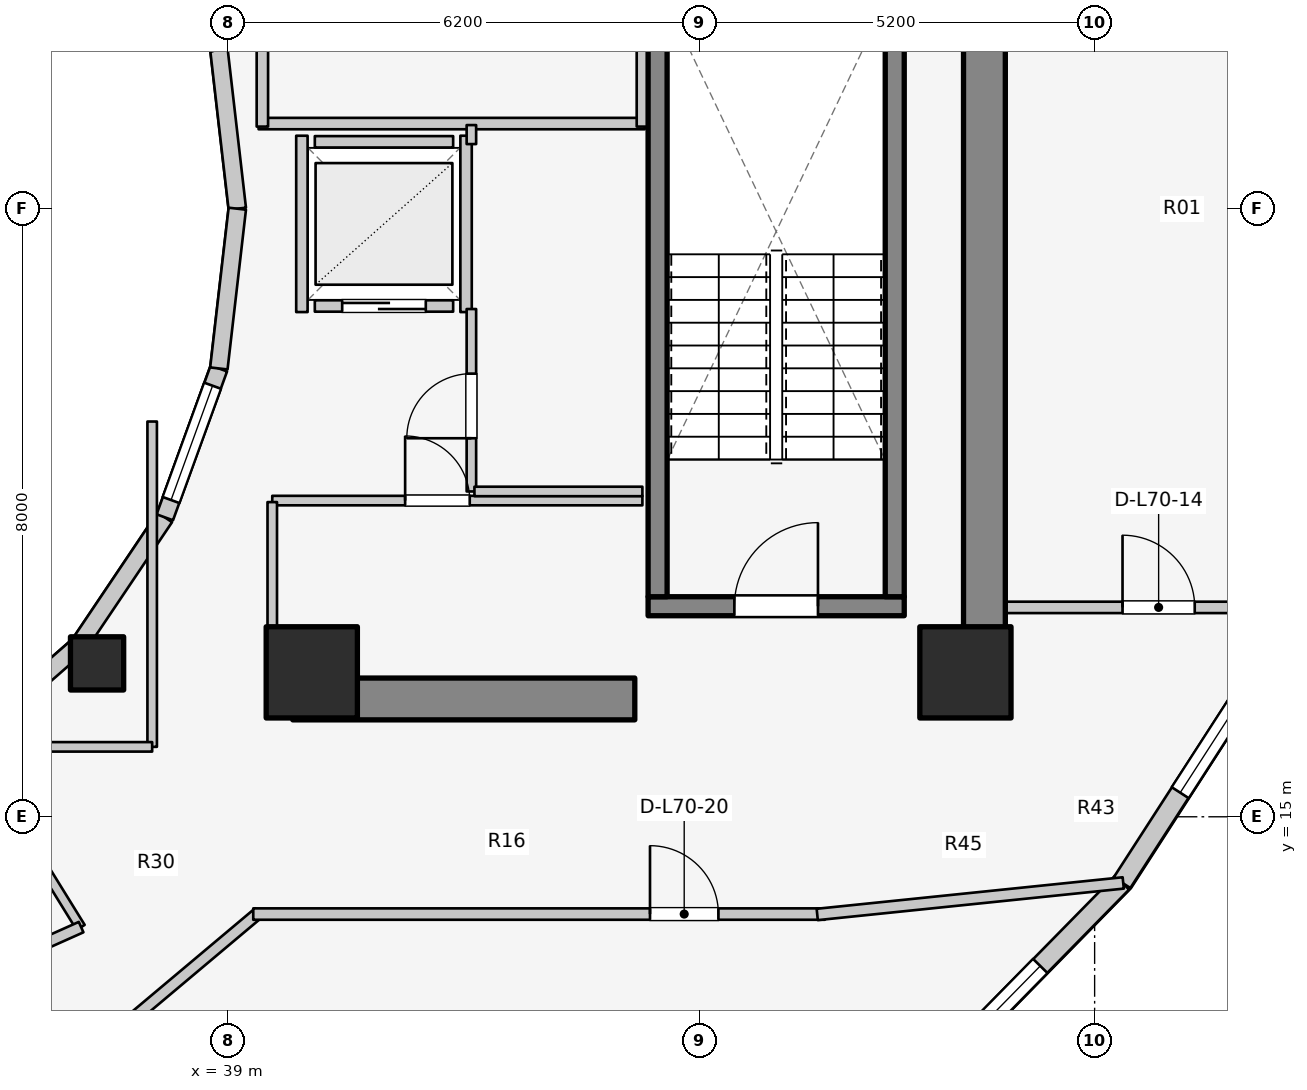
"""IFC4 building model, lengths in metres.
Left out: names, types, materials, properties, quantities, classifications, styles, units other than length and angle.
Written with IfcOpenShell. Run it as: python <this file> out.ifc"""

import sys

from ifc_helpers import new_model, si_unit, direction, frame, frame_2d, origin, origin_2d, place, context, subcontext, project, spatial, rectangle, extrude, element, fill, save


model = new_model("IFC4")
c1 = context("Model", 3, precision=1e-05, world=origin(), true_north=direction((0.0, 1.0)))
c2 = subcontext(c1, "Body", "Model", "MODEL_VIEW")
j1 = project(units=[si_unit("LENGTHUNIT", "METRE"), si_unit("PLANEANGLEUNIT", "RADIAN")], contexts=[c1])
p1 = place(None, origin())
s1 = spatial("IfcSite", under=j1, at=p1, CompositionType="ELEMENT")
p2 = place(p1, origin())
s2 = spatial("IfcBuilding", under=s1, at=p2, CompositionType="ELEMENT")
p3 = place(p2, frame((0.0, 0.0, 229.5)))
s3 = spatial("IfcBuildingStorey", under=s2, at=p3, CompositionType="ELEMENT", Elevation=229.5)
p4 = place(p3, frame((48.95, 17.05, 0.0), z_axis=(0.0, 0.0, 1.0), x_axis=(0.0, 1.0, 0.0)))
e1 = element("IfcWall", 1, at=p4, inside=s3, PredefinedType="SHEAR", context=c2, shape_type="SweptSolid", body=[
    extrude(rectangle(XDim=12.8, YDim=0.55, at=frame_2d((6.4, 0.0))), origin(), (0.0, 0.0, 1.0), 3.1),
])
p5 = place(p3, frame((39.85, 16.55, 0.0), z_axis=(0.0, 0.0, 1.0), x_axis=(1.0, 0.0, 0.0)))
e2 = element("IfcWall", 2, at=p5, inside=s3, PredefinedType="SHEAR", context=c2, shape_type="SweptSolid", body=[
    extrude(rectangle(XDim=4.5, YDim=0.55, at=frame_2d((2.25, 0.0))), origin(), (0.0, 0.0, 1.0), 3.1),
])
p6 = place(p3, frame((44.525, 17.77, 0.0), z_axis=(0.0, 0.0, 1.0), x_axis=(1.0, 0.0, 0.0)))
e3 = element("IfcWall", 3, at=p6, inside=s3, PredefinedType="SOLIDWALL", context=c2, shape_type="SweptSolid", body=[
    extrude(rectangle(XDim=3.37, YDim=0.25, at=frame_2d((1.685, 0.0))), origin(), (0.0, 0.0, 1.0), 3.1),
])
p7 = place(p6, frame((1.135, 0.0, 0.0)))
e4 = element("IfcOpeningElement", 4, at=p7, cuts=e3, PredefinedType="OPENING", context=c2, shape_type="SweptSolid", body=[
    extrude(rectangle(XDim=1.1, YDim=2.1, at=frame_2d((0.55, 1.05))), frame((0.0, 0.135, 0.0), z_axis=(0.0, -1.0, 0.0), x_axis=(1.0, 0.0, 0.0)), (0.0, 0.0, 1.0), 0.27),
])
for number, where, z_axis, x_axis in (
    (5, (44.65, 17.895, 0.0), (0.0, 0.0, 1.0), (0.0, 1.0, 0.0)),
    (6, (47.77, 17.895, 0.0), (0.0, 0.0, 1.0), (0.0, 1.0, 0.0)),
):
    element("IfcWall", number, at=place(p3, frame(where, z_axis=z_axis, x_axis=x_axis)), inside=s3, PredefinedType="SOLIDWALL", context=c2, shape_type="SweptSolid", body=[
        extrude(rectangle(XDim=7.81, YDim=0.25, at=frame_2d((3.905, 0.0))), origin(), (0.0, 0.0, 1.0), 3.1),
    ])
for number, where, z_axis, x_axis in (
    (7, (40.1, 16.9, 0.0), (0.0, 0.0, 1.0), (1.0, 0.0, 0.0)),
    (8, (48.7, 16.9, 0.0), (0.0, 0.0, 1.0), (1.0, 0.0, 0.0)),
):
    element("IfcColumn", number, at=place(p3, frame(where, z_axis=z_axis, x_axis=x_axis)), inside=s3, PredefinedType="COLUMN", context=c2, shape_type="SweptSolid", body=[
        extrude(rectangle(XDim=1.2, YDim=1.2, at=origin_2d()), origin(), (0.0, 0.0, 1.0), 3.1),
    ])
p8 = place(p3, frame((37.275, 17.018, 0.0), z_axis=(0.0, 0.0, 1.0), x_axis=(1.0, 0.0, 0.0)))
e9 = element("IfcColumn", 9, at=p8, inside=s3, PredefinedType="COLUMN", context=c2, shape_type="SweptSolid", body=[
    extrude(rectangle(XDim=0.7, YDim=0.7, at=origin_2d()), origin(), (0.0, 0.0, 1.0), 3.1),
])
p9 = place(p3, frame((39.12, 23.0, 0.0), z_axis=(0.0, 0.0, 1.0), x_axis=(-0.114711713601, 0.993398823617, 0.0)))
e10 = element("IfcWall", 10, at=p9, inside=s3, PredefinedType="STANDARD", context=c2, shape_type="SweptSolid", body=[
    extrude(rectangle(XDim=2.115, YDim=0.23, at=frame_2d((1.058, 0.0))), origin(), (0.0, 0.0, 1.0), 2.84),
])
p10 = place(p3, frame((35.56, 15.968, 0.0), z_axis=(0.0, 0.0, 1.0), x_axis=(0.752576694707, 0.658504607869, 0.0)))
e11 = element("IfcWall", 11, at=p10, inside=s3, PredefinedType="STANDARD", context=c2, shape_type="SweptSolid", body=[
    extrude(rectangle(XDim=1.959, YDim=0.23, at=frame_2d((0.98, 0.0))), origin(), (0.0, 0.0, 1.0), 2.16),
])
p11 = place(p3, frame((37.035, 17.258, 0.0), z_axis=(0.0, 0.0, 1.0), x_axis=(0.558197800898, 0.829707909492, 0.0)))
e12 = element("IfcWall", 12, at=p11, inside=s3, PredefinedType="STANDARD", context=c2, shape_type="SweptSolid", body=[
    extrude(rectangle(XDim=2.027, YDim=0.23, at=frame_2d((1.013, 0.0))), origin(), (0.0, 0.0, 1.0), 2.16),
])
p12 = place(p3, frame((38.166, 18.94, 0.0), z_axis=(0.0, 0.0, 1.0), x_axis=(0.341423187295, 0.93990968033, 0.0)))
e13 = element("IfcWall", 13, at=p12, inside=s3, PredefinedType="STANDARD", context=c2, shape_type="SweptSolid", body=[
    extrude(rectangle(XDim=2.084, YDim=0.23, at=frame_2d((1.042, 0.0))), origin(), (0.0, 0.0, 1.0), 2.84),
])
p13 = place(p12, frame((0.242, 0.0, 0.85)))
e14 = element("IfcOpeningElement", 14, at=p13, cuts=e13, PredefinedType="OPENING", context=c2, shape_type="SweptSolid", body=[
    extrude(rectangle(XDim=1.6, YDim=1.65, at=frame_2d((0.8, 0.825))), frame((0.0, 0.125, 0.0), z_axis=(0.0, -1.0, 0.0), x_axis=(1.0, 0.0, 0.0)), (0.0, 0.0, 1.0), 0.25),
])
p14 = place(p3, frame((38.877, 20.898, 0.0), z_axis=(0.0, 0.0, 1.0), x_axis=(0.114711713601, 0.993398823617, 0.0)))
e15 = element("IfcWall", 15, at=p14, inside=s3, PredefinedType="STANDARD", context=c2, shape_type="SweptSolid", body=[
    extrude(rectangle(XDim=2.115, YDim=0.23, at=frame_2d((1.058, 0.0))), origin(), (0.0, 0.0, 1.0), 2.84),
])
p15 = place(p3, frame((47.558, 10.871, 0.0), z_axis=(0.0, 0.0, 1.0), x_axis=(0.700642973333, 0.713512034881, 0.0)))
e16 = element("IfcWall", 16, at=p15, inside=s3, PredefinedType="STANDARD", context=c2, shape_type="SweptSolid", body=[
    extrude(rectangle(XDim=4.572, YDim=0.26, at=frame_2d((2.286, 0.0))), origin(), (0.0, 0.0, 1.0), 2.85),
])
p16 = place(p15, frame((1.536, 0.0, 0.75)))
e17 = element("IfcOpeningElement", 17, at=p16, cuts=e16, PredefinedType="OPENING", context=c2, shape_type="SweptSolid", body=[
    extrude(rectangle(XDim=1.5, YDim=1.6, at=frame_2d((0.75, 0.8))), frame((0.0, 0.14, 0.0), z_axis=(0.0, -1.0, 0.0), x_axis=(1.0, 0.0, 0.0)), (0.0, 0.0, 1.0), 0.28),
])
p17 = place(p3, frame((50.761, 14.133, 0.0), z_axis=(0.0, 0.0, 1.0), x_axis=(0.542641766008, 0.839964233634, 0.0)))
e18 = element("IfcWall", 18, at=p17, inside=s3, PredefinedType="STANDARD", context=c2, shape_type="SweptSolid", body=[
    extrude(rectangle(XDim=4.319, YDim=0.26, at=frame_2d((2.16, 0.0))), origin(), (0.0, 0.0, 1.0), 2.85),
])
p18 = place(p17, frame((1.41, 0.0, 0.75)))
e19 = element("IfcOpeningElement", 19, at=p18, cuts=e18, PredefinedType="OPENING", context=c2, shape_type="SweptSolid", body=[
    extrude(rectangle(XDim=1.5, YDim=1.6, at=frame_2d((0.75, 0.8))), frame((0.0, 0.14, 0.0), z_axis=(0.0, -1.0, 0.0), x_axis=(1.0, 0.0, 0.0)), (0.0, 0.0, 1.0), 0.28),
])
p19 = place(p3, frame((40.14, 21.72, 0.0), z_axis=(0.0, 0.0, 1.0), x_axis=(1.0, 0.0, 0.0)))
e20 = element("IfcWall", 20, at=p19, inside=s3, PredefinedType="SOLIDWALL", context=c2, shape_type="SweptSolid", body=[
    extrude(rectangle(XDim=1.82, YDim=0.15, at=frame_2d((0.91, 0.0))), origin(), (0.0, 0.0, 1.0), 2.12),
])
p20 = place(p19, frame((0.36, 0.0, 0.0)))
e21 = element("IfcOpeningElement", 21, at=p20, cuts=e20, PredefinedType="OPENING", context=c2, shape_type="SweptSolid", body=[
    extrude(rectangle(XDim=1.1, YDim=2.1, at=frame_2d((0.55, 1.05))), frame((0.0, 0.085, 0.0), z_axis=(0.0, -1.0, 0.0), x_axis=(1.0, 0.0, 0.0)), (0.0, 0.0, 1.0), 0.17),
])
p21 = place(p3, frame((40.14, 23.88, 0.0), z_axis=(0.0, 0.0, 1.0), x_axis=(1.0, 0.0, 0.0)))
e22 = element("IfcWall", 22, at=p21, inside=s3, PredefinedType="SOLIDWALL", context=c2, shape_type="SweptSolid", body=[
    extrude(rectangle(XDim=1.82, YDim=0.15, at=frame_2d((0.91, 0.0))), origin(), (0.0, 0.0, 1.0), 2.12),
])
p22 = place(p3, frame((39.97, 21.64, 0.0), z_axis=(0.0, 0.0, 1.0), x_axis=(0.0, 1.0, 0.0)))
e23 = element("IfcWall", 23, at=p22, inside=s3, PredefinedType="SOLIDWALL", context=c2, shape_type="SweptSolid", body=[
    extrude(rectangle(XDim=2.32, YDim=0.15, at=frame_2d((1.16, 0.0))), origin(), (0.0, 0.0, 1.0), 2.12),
])
p23 = place(p3, frame((42.13, 21.64, 0.0), z_axis=(0.0, 0.0, 1.0), x_axis=(0.0, 1.0, 0.0)))
e24 = element("IfcWall", 24, at=p23, inside=s3, PredefinedType="SOLIDWALL", context=c2, shape_type="SweptSolid", body=[
    extrude(rectangle(XDim=2.32, YDim=0.15, at=frame_2d((1.16, 0.0))), origin(), (0.0, 0.0, 1.0), 2.855),
])
p24 = place(p3, frame((39.4, 24.12, 0.0), z_axis=(0.0, 0.0, 1.0), x_axis=(1.0, 0.0, 0.0)))
e25 = element("IfcWall", 25, at=p24, inside=s3, PredefinedType="PARTITIONING", context=c2, shape_type="SweptSolid", body=[
    extrude(rectangle(XDim=5.08, YDim=0.15, at=frame_2d((2.54, 0.0))), origin(), (0.0, 0.0, 1.0), 2.12),
])
p25 = place(p3, frame((44.45, 24.08, 0.0), z_axis=(0.0, 0.0, 1.0), x_axis=(0.0, 1.0, 0.0)))
e26 = element("IfcWall", 26, at=p25, inside=s3, PredefinedType="PARTITIONING", context=c2, shape_type="SweptSolid", body=[
    extrude(rectangle(XDim=3.2, YDim=0.15, at=frame_2d((1.6, 0.0))), origin(), (0.0, 0.0, 1.0), 2.855),
])
p26 = place(p3, frame((39.45, 24.08, 0.0), z_axis=(0.0, 0.0, 1.0), x_axis=(0.0, 1.0, 0.0)))
e27 = element("IfcWall", 27, at=p26, inside=s3, PredefinedType="PARTITIONING", context=c2, shape_type="SweptSolid", body=[
    extrude(rectangle(XDim=3.4, YDim=0.15, at=frame_2d((1.7, 0.0))), origin(), (0.0, 0.0, 1.0), 2.855),
])
p27 = place(p26, frame((1.894, 0.0, 0.0)))
e28 = element("IfcOpeningElement", 28, at=p27, cuts=e27, PredefinedType="OPENING", context=c2, shape_type="SweptSolid", body=[
    extrude(rectangle(XDim=1.1, YDim=2.1, at=frame_2d((0.55, 1.05))), frame((0.0, 0.085, 0.0), z_axis=(0.0, -1.0, 0.0), x_axis=(1.0, 0.0, 0.0)), (0.0, 0.0, 1.0), 0.17),
])
p28 = place(p3, frame((39.58, 19.16, 0.0), z_axis=(0.0, 0.0, 1.0), x_axis=(1.0, 0.0, 0.0)))
e29 = element("IfcWall", 29, at=p28, inside=s3, PredefinedType="PARTITIONING", context=c2, shape_type="SweptSolid", body=[
    extrude(rectangle(XDim=4.87, YDim=0.125, at=frame_2d((2.435, 0.0))), origin(), (0.0, 0.0, 1.0), 2.12),
])
p29 = place(p28, frame((1.748, 0.0, 0.0)))
e30 = element("IfcOpeningElement", 30, at=p29, cuts=e29, PredefinedType="OPENING", context=c2, shape_type="SweptSolid", body=[
    extrude(rectangle(XDim=0.85, YDim=2.05, at=frame_2d((0.425, 1.025))), frame((0.0, 0.073, 0.0), z_axis=(0.0, -1.0, 0.0), x_axis=(1.0, 0.0, 0.0)), (0.0, 0.0, 1.0), 0.145),
])
p30 = place(p3, frame((39.58, 17.1, 0.0), z_axis=(0.0, 0.0, 1.0), x_axis=(0.0, 1.0, 0.0)))
e31 = element("IfcWall", 31, at=p30, inside=s3, PredefinedType="PARTITIONING", context=c2, shape_type="SweptSolid", body=[
    extrude(rectangle(XDim=2.04, YDim=0.125, at=frame_2d((1.02, 0.0))), origin(), (0.0, 0.0, 1.0), 2.232),
])
p31 = place(p3, frame((42.2, 19.28, 0.0), z_axis=(0.0, 0.0, 1.0), x_axis=(0.0, 1.0, 0.0)))
e32 = element("IfcWall", 32, at=p31, inside=s3, PredefinedType="PARTITIONING", context=c2, shape_type="SweptSolid", body=[
    extrude(rectangle(XDim=2.4, YDim=0.125, at=frame_2d((1.2, 0.0))), origin(), (0.0, 0.0, 1.0), 2.855),
])
p32 = place(p31, frame((0.7, 0.0, 0.0)))
e33 = element("IfcOpeningElement", 33, at=p32, cuts=e32, PredefinedType="OPENING", context=c2, shape_type="SweptSolid", body=[
    extrude(rectangle(XDim=0.85, YDim=2.05, at=frame_2d((0.425, 1.025))), frame((0.0, 0.073, 0.0), z_axis=(0.0, -1.0, 0.0), x_axis=(1.0, 0.0, 0.0)), (0.0, 0.0, 1.0), 0.145),
])
p33 = place(p3, frame((42.2, 23.85, 0.0), z_axis=(0.0, 0.0, 1.0), x_axis=(0.0, 1.0, 0.0)))
e34 = element("IfcWall", 34, at=p33, inside=s3, PredefinedType="PARTITIONING", context=c2, shape_type="SweptSolid", body=[
    extrude(rectangle(XDim=0.25, YDim=0.125, at=frame_2d((0.125, 0.0))), origin(), (0.0, 0.0, 1.0), 2.855),
])
p34 = place(p3, frame((42.24, 19.28, 0.0), z_axis=(0.0, 0.0, 1.0), x_axis=(1.0, 0.0, 0.0)))
e35 = element("IfcWall", 35, at=p34, inside=s3, PredefinedType="PARTITIONING", context=c2, shape_type="SweptSolid", body=[
    extrude(rectangle(XDim=2.21, YDim=0.125, at=frame_2d((1.105, 0.0))), origin(), (0.0, 0.0, 1.0), 2.12),
])
p35 = place(p3, frame((35.55, 15.985, 0.0), z_axis=(0.0, 0.0, 1.0), x_axis=(0.52592395012, -0.850531597702, 0.0)))
e36 = element("IfcWall", 36, at=p35, inside=s3, PredefinedType="PARTITIONING", context=c2, shape_type="SweptSolid", body=[
    extrude(rectangle(XDim=2.869, YDim=0.125, at=frame_2d((1.435, 0.0))), origin(), (0.0, 0.0, 1.0), 2.376),
])
p36 = place(p3, frame((34.617, 12.454, 0.0), z_axis=(0.0, 0.0, 1.0), x_axis=(0.912859324183, 0.408274239027, 0.0)))
e37 = element("IfcWall", 37, at=p36, inside=s3, PredefinedType="PARTITIONING", context=c2, shape_type="SweptSolid", body=[
    extrude(rectangle(XDim=2.682, YDim=0.15, at=frame_2d((1.341, 0.0))), origin(), (0.0, 0.0, 1.0), 2.376),
])
p37 = place(p36, frame((0.866, 0.0, 0.0)))
e38 = element("IfcOpeningElement", 38, at=p37, cuts=e37, PredefinedType="OPENING", context=c2, shape_type="SweptSolid", body=[
    extrude(rectangle(XDim=0.95, YDim=2.1, at=frame_2d((0.475, 1.05))), frame((0.0, 0.085, 0.0), z_axis=(0.0, -1.0, 0.0), x_axis=(1.0, 0.0, 0.0)), (0.0, 0.0, 1.0), 0.17),
])
p38 = place(p3, frame((38.0, 15.92, 0.0), z_axis=(0.0, 0.0, 1.0), x_axis=(0.0, 1.0, 0.0)))
e39 = element("IfcWall", 39, at=p38, inside=s3, PredefinedType="PARTITIONING", context=c2, shape_type="SweptSolid", body=[
    extrude(rectangle(XDim=4.28, YDim=0.125, at=frame_2d((2.14, 0.0))), origin(), (0.0, 0.0, 1.0), 2.232),
])
p39 = place(p3, frame((35.4, 15.92, 0.0), z_axis=(0.0, 0.0, 1.0), x_axis=(1.0, 0.0, 0.0)))
e40 = element("IfcWall", 40, at=p39, inside=s3, PredefinedType="PARTITIONING", context=c2, shape_type="SweptSolid", body=[
    extrude(rectangle(XDim=2.6, YDim=0.125, at=frame_2d((1.3, 0.0))), origin(), (0.0, 0.0, 1.0), 2.232),
])
p40 = place(p3, frame((48.95, 17.755, 0.0), z_axis=(0.0, 0.0, 1.0), x_axis=(1.0, 0.0, 0.0)))
e41 = element("IfcWall", 41, at=p40, inside=s3, PredefinedType="PARTITIONING", context=c2, shape_type="SweptSolid", body=[
    extrude(rectangle(XDim=4.175, YDim=0.15, at=frame_2d((2.087, 0.0))), origin(), (0.0, 0.0, 1.0), 2.855),
])
p41 = place(p40, frame((1.817, 0.0, 0.0)))
e42 = element("IfcOpeningElement", 42, at=p41, cuts=e41, PredefinedType="OPENING", context=c2, shape_type="SweptSolid", body=[
    extrude(rectangle(XDim=0.95, YDim=2.1, at=frame_2d((0.475, 1.05))), frame((0.0, 0.085, 0.0), z_axis=(0.0, -1.0, 0.0), x_axis=(1.0, 0.0, 0.0)), (0.0, 0.0, 1.0), 0.17),
])
p42 = place(p3, frame((37.791, 12.385, 0.0), z_axis=(0.0, 0.0, 1.0), x_axis=(0.765677451641, 0.643224719711, 0.0)))
e43 = element("IfcWall", 43, at=p42, inside=s3, PredefinedType="PARTITIONING", context=c2, shape_type="SweptSolid", body=[
    extrude(rectangle(XDim=2.105, YDim=0.15, at=frame_2d((1.053, 0.0))), origin(), (0.0, 0.0, 1.0), 2.376),
])
p43 = place(p3, frame((39.33, 13.72, 0.0), z_axis=(0.0, 0.0, 1.0), x_axis=(1.0, 0.0, 0.0)))
e44 = element("IfcWall", 44, at=p43, inside=s3, PredefinedType="PARTITIONING", context=c2, shape_type="SweptSolid", body=[
    extrude(rectangle(XDim=7.52, YDim=0.15, at=frame_2d((3.76, 0.0))), origin(), (0.0, 0.0, 1.0), 2.376),
])
p44 = place(p43, frame((5.22, 0.0, 0.0)))
e45 = element("IfcOpeningElement", 45, at=p44, cuts=e44, PredefinedType="OPENING", context=c2, shape_type="SweptSolid", body=[
    extrude(rectangle(XDim=0.9, YDim=2.1, at=frame_2d((0.45, 1.05))), frame((0.0, 0.085, 0.0), z_axis=(0.0, -1.0, 0.0), x_axis=(1.0, 0.0, 0.0)), (0.0, 0.0, 1.0), 0.17),
])
p45 = place(p3, frame((46.75, 13.715, 0.0), z_axis=(0.0, 0.0, 1.0), x_axis=(0.994734711466, 0.102483431859, 0.0)))
e46 = element("IfcWall", 46, at=p45, inside=s3, PredefinedType="PARTITIONING", context=c2, shape_type="SweptSolid", body=[
    extrude(rectangle(XDim=4.047, YDim=0.15, at=frame_2d((2.024, 0.0))), origin(), (0.0, 0.0, 1.0), 2.22),
])
p46 = place(p13, origin())
e47 = element("IfcWindow", 47, at=p46, inside=s3, PartitioningType="SINGLE_PANEL", PredefinedType="WINDOW", context=c2, shape_type="SweptSolid", body=[
    extrude(rectangle(XDim=1.6, YDim=1.65, at=frame_2d((0.8, 0.825))), frame((0.0, 0.03, 0.0), z_axis=(0.0, -1.0, 0.0), x_axis=(1.0, 0.0, 0.0)), (0.0, 0.0, 1.0), 0.06),
])
fill(e14, e47)
p47 = place(p16, origin())
e48 = element("IfcWindow", 48, at=p47, inside=s3, PartitioningType="SINGLE_PANEL", PredefinedType="WINDOW", context=c2, shape_type="SweptSolid", body=[
    extrude(rectangle(XDim=1.5, YDim=1.6, at=frame_2d((0.75, 0.8))), frame((0.0, 0.03, 0.0), z_axis=(0.0, -1.0, 0.0), x_axis=(1.0, 0.0, 0.0)), (0.0, 0.0, 1.0), 0.06),
])
fill(e17, e48)
p48 = place(p18, origin())
e49 = element("IfcWindow", 49, at=p48, inside=s3, PartitioningType="SINGLE_PANEL", PredefinedType="WINDOW", context=c2, shape_type="SweptSolid", body=[
    extrude(rectangle(XDim=1.5, YDim=1.6, at=frame_2d((0.75, 0.8))), frame((0.0, 0.03, 0.0), z_axis=(0.0, -1.0, 0.0), x_axis=(1.0, 0.0, 0.0)), (0.0, 0.0, 1.0), 0.06),
])
fill(e19, e49)
p49 = place(p7, origin())
e50 = element("IfcDoor", 50, at=p49, inside=s3, OperationType="SINGLE_SWING_RIGHT", PredefinedType="DOOR", context=c2, shape_type="SweptSolid", body=[
    extrude(rectangle(XDim=1.1, YDim=2.1, at=frame_2d((0.55, 1.05))), frame((0.0, 0.025, 0.0), z_axis=(0.0, -1.0, 0.0), x_axis=(1.0, 0.0, 0.0)), (0.0, 0.0, 1.0), 0.05),
])
fill(e4, e50)
p50 = place(p20, origin())
e51 = element("IfcDoor", 51, at=p50, inside=s3, OperationType="DOUBLE_DOOR_SLIDING", PredefinedType="DOOR", context=c2, shape_type="SweptSolid", body=[
    extrude(rectangle(XDim=1.1, YDim=2.1, at=frame_2d((0.55, 1.05))), frame((0.0, 0.025, 0.0), z_axis=(0.0, -1.0, 0.0), x_axis=(1.0, 0.0, 0.0)), (0.0, 0.0, 1.0), 0.05),
])
fill(e21, e51)
p51 = place(p29, origin())
e52 = element("IfcDoor", 52, at=p51, inside=s3, OperationType="SINGLE_SWING_LEFT", PredefinedType="DOOR", context=c2, shape_type="SweptSolid", body=[
    extrude(rectangle(XDim=0.85, YDim=2.05, at=frame_2d((0.425, 1.025))), frame((0.0, 0.025, 0.0), z_axis=(0.0, -1.0, 0.0), x_axis=(1.0, 0.0, 0.0)), (0.0, 0.0, 1.0), 0.05),
])
fill(e30, e52)
p52 = place(p32, origin())
e53 = element("IfcDoor", 53, at=p52, inside=s3, OperationType="SINGLE_SWING_LEFT", PredefinedType="DOOR", context=c2, shape_type="SweptSolid", body=[
    extrude(rectangle(XDim=0.85, YDim=2.05, at=frame_2d((0.425, 1.025))), frame((0.0, 0.025, 0.0), z_axis=(0.0, -1.0, 0.0), x_axis=(1.0, 0.0, 0.0)), (0.0, 0.0, 1.0), 0.05),
])
fill(e33, e53)
p53 = place(p41, origin())
e54 = element("IfcDoor", 54, at=p53, inside=s3, OperationType="SINGLE_SWING_LEFT", PredefinedType="DOOR", context=c2, shape_type="SweptSolid", body=[
    extrude(rectangle(XDim=0.95, YDim=2.1, at=frame_2d((0.475, 1.05))), frame((0.0, 0.025, 0.0), z_axis=(0.0, -1.0, 0.0), x_axis=(1.0, 0.0, 0.0)), (0.0, 0.0, 1.0), 0.05),
])
fill(e42, e54)
p54 = place(p44, origin())
e55 = element("IfcDoor", 55, at=p54, inside=s3, OperationType="SINGLE_SWING_LEFT", PredefinedType="DOOR", context=c2, shape_type="SweptSolid", body=[
    extrude(rectangle(XDim=0.9, YDim=2.1, at=frame_2d((0.45, 1.05))), frame((0.0, 0.025, 0.0), z_axis=(0.0, -1.0, 0.0), x_axis=(1.0, 0.0, 0.0)), (0.0, 0.0, 1.0), 0.05),
])
fill(e45, e55)
save(model, sys.argv[1])
